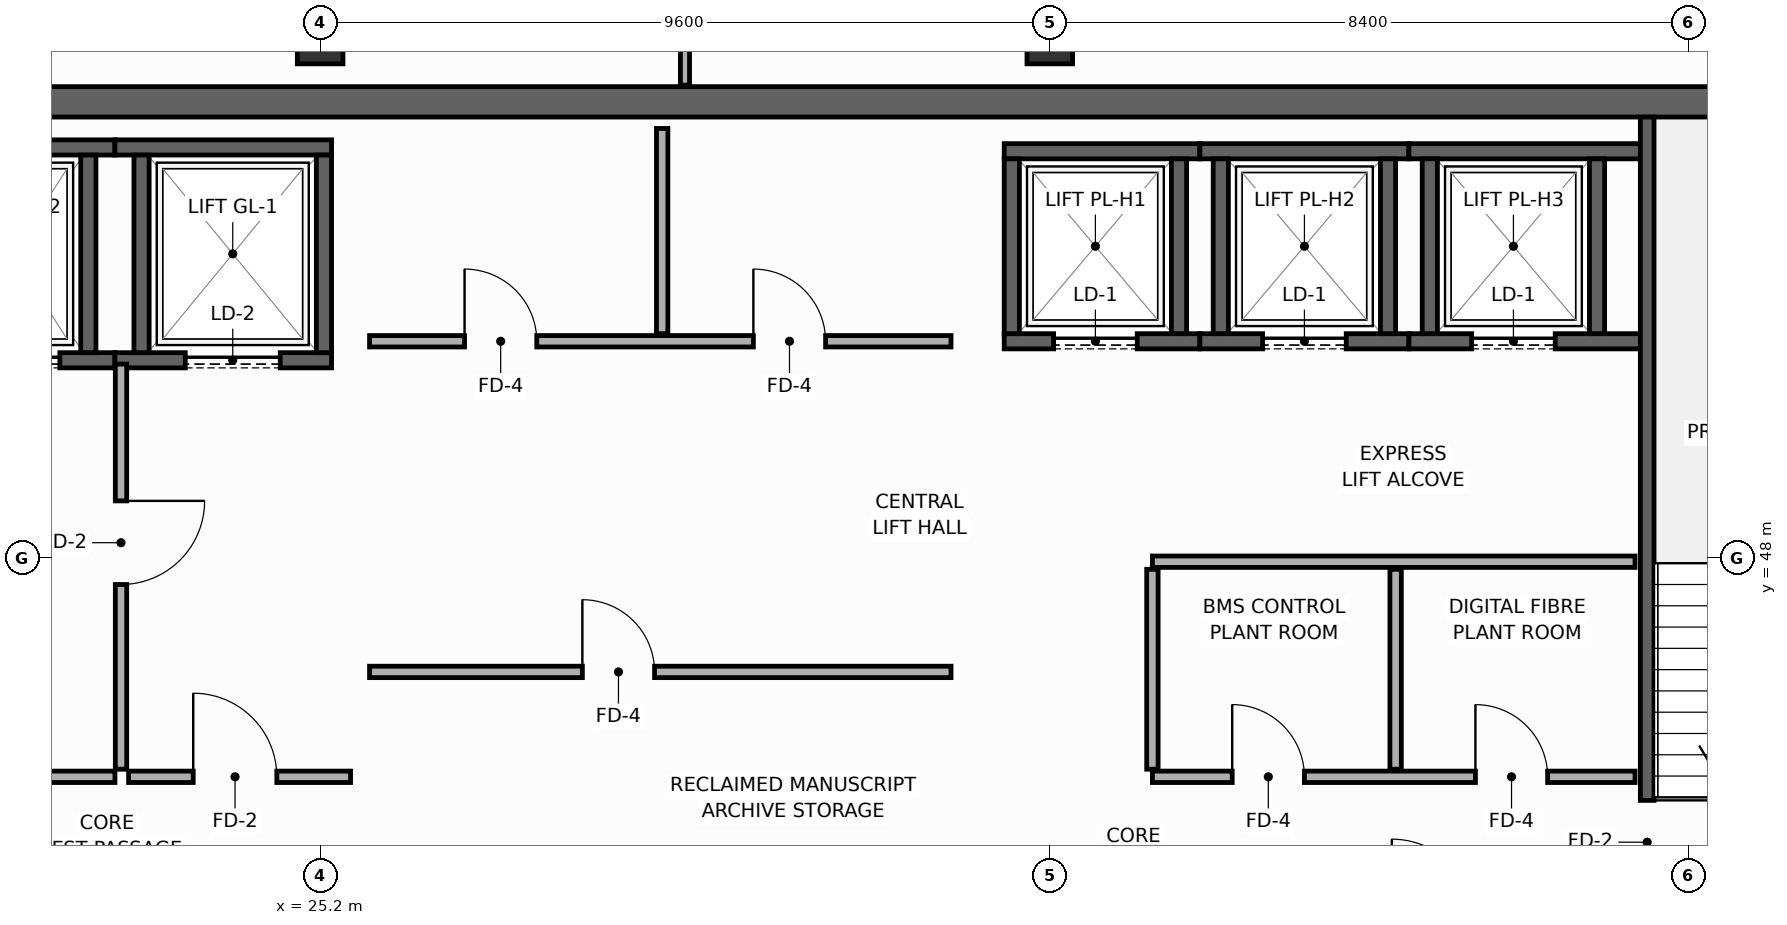
"""IFC4 building model, lengths in metres.
Left out: names, types, materials, properties, quantities, classifications, styles, units other than length and angle.
Written with IfcOpenShell. Run it as: python <this file> out.ifc"""

import sys

from ifc_helpers import new_model, si_unit, direction, frame, frame_2d, origin, origin_2d, place, context, subcontext, project, spatial, rectangle, hollow_rectangle, extrude, element, fill, save


model = new_model("IFC4")
c1 = context("Model", 3, precision=1e-05, world=origin(), true_north=direction((0.0, 1.0)))
c2 = subcontext(c1, "Body", "Model", "MODEL_VIEW")
j1 = project(units=[si_unit("LENGTHUNIT", "METRE"), si_unit("PLANEANGLEUNIT", "RADIAN")], contexts=[c1])
p1 = place(None, origin())
s1 = spatial("IfcSite", under=j1, at=p1, CompositionType="ELEMENT")
p2 = place(p1, origin())
s2 = spatial("IfcBuilding", under=s1, at=p2, CompositionType="ELEMENT")
p3 = place(p2, frame((0.0, 0.0, 319.2)))
s3 = spatial("IfcBuildingStorey", under=s2, at=p3, CompositionType="ELEMENT", Elevation=319.2)
p4 = place(p3, frame((13.7, 54.0, 0.0), z_axis=(0.0, 0.0, 1.0), x_axis=(1.0, 0.0, 0.0)))
e1 = element("IfcWall", 1, at=p4, inside=s3, PredefinedType="SHEAR", context=c2, shape_type="SweptSolid", body=[
    extrude(rectangle(XDim=32.5, YDim=0.4, at=frame_2d((16.25, 0.0))), origin(), (0.0, 0.0, 1.0), 3.95),
])
for number, where, z_axis, x_axis in (
    (2, (25.2, 54.8, 0.0), (0.0, 0.0, 1.0), (1.0, 0.0, 0.0)),
    (3, (34.8, 54.8, 0.0), (0.0, 0.0, 1.0), (1.0, 0.0, 0.0)),
):
    element("IfcColumn", number, at=place(p3, frame(where, z_axis=z_axis, x_axis=x_axis)), inside=s3, PredefinedType="COLUMN", context=c2, shape_type="SweptSolid", body=[
        extrude(hollow_rectangle(XDim=0.6, YDim=0.6, WallThickness=0.028, at=origin_2d()), origin(), (0.0, 0.0, 1.0), 4.2),
    ])
p5 = place(p3, frame((19.85, 50.6, 0.0), z_axis=(0.0, 0.0, 1.0), x_axis=(1.0, 0.0, 0.0)))
e4 = element("IfcWall", 4, at=p5, inside=s3, PredefinedType="SHEAR", context=c2, shape_type="SweptSolid", body=[
    extrude(rectangle(XDim=2.65, YDim=0.2, at=frame_2d((1.325, 0.0))), origin(), (0.0, 0.0, 1.0), 3.95),
])
p6 = place(p5, frame((0.675, 0.0, 0.0)))
e5 = element("IfcOpeningElement", 5, at=p6, cuts=e4, PredefinedType="OPENING", context=c2, shape_type="SweptSolid", body=[
    extrude(rectangle(XDim=1.25, YDim=2.3, at=frame_2d((0.625, 1.15))), frame((0.0, 0.11, 0.0), z_axis=(0.0, -1.0, 0.0), x_axis=(1.0, 0.0, 0.0)), (0.0, 0.0, 1.0), 0.22),
])
p7 = place(p3, frame((19.85, 53.4, 0.0), z_axis=(0.0, 0.0, 1.0), x_axis=(1.0, 0.0, 0.0)))
e6 = element("IfcWall", 6, at=p7, inside=s3, PredefinedType="SHEAR", context=c2, shape_type="SweptSolid", body=[
    extrude(rectangle(XDim=2.65, YDim=0.2, at=frame_2d((1.325, 0.0))), origin(), (0.0, 0.0, 1.0), 3.95),
])
p8 = place(p3, frame((22.15, 50.7, 0.0), z_axis=(0.0, 0.0, 1.0), x_axis=(0.0, 1.0, 0.0)))
e7 = element("IfcWall", 7, at=p8, inside=s3, PredefinedType="SHEAR", context=c2, shape_type="SweptSolid", body=[
    extrude(rectangle(XDim=2.6, YDim=0.2, at=frame_2d((1.3, 0.0))), origin(), (0.0, 0.0, 1.0), 3.95),
])
p9 = place(p3, frame((22.5, 50.6, 0.0), z_axis=(0.0, 0.0, 1.0), x_axis=(1.0, 0.0, 0.0)))
e8 = element("IfcWall", 8, at=p9, inside=s3, PredefinedType="SHEAR", context=c2, shape_type="SweptSolid", body=[
    extrude(rectangle(XDim=2.85, YDim=0.2, at=frame_2d((1.425, 0.0))), origin(), (0.0, 0.0, 1.0), 3.95),
])
p10 = place(p9, frame((0.925, 0.0, 0.0)))
e9 = element("IfcOpeningElement", 9, at=p10, cuts=e8, PredefinedType="OPENING", context=c2, shape_type="SweptSolid", body=[
    extrude(rectangle(XDim=1.25, YDim=2.3, at=frame_2d((0.625, 1.15))), frame((0.0, 0.11, 0.0), z_axis=(0.0, -1.0, 0.0), x_axis=(1.0, 0.0, 0.0)), (0.0, 0.0, 1.0), 0.22),
])
p11 = place(p3, frame((22.5, 53.4, 0.0), z_axis=(0.0, 0.0, 1.0), x_axis=(1.0, 0.0, 0.0)))
e10 = element("IfcWall", 10, at=p11, inside=s3, PredefinedType="SHEAR", context=c2, shape_type="SweptSolid", body=[
    extrude(rectangle(XDim=2.85, YDim=0.2, at=frame_2d((1.425, 0.0))), origin(), (0.0, 0.0, 1.0), 3.95),
])
for number, where, z_axis, x_axis in (
    (11, (22.85, 50.7, 0.0), (0.0, 0.0, 1.0), (0.0, 1.0, 0.0)),
    (12, (25.25, 50.7, 0.0), (0.0, 0.0, 1.0), (0.0, 1.0, 0.0)),
):
    element("IfcWall", number, at=place(p3, frame(where, z_axis=z_axis, x_axis=x_axis)), inside=s3, PredefinedType="SHEAR", context=c2, shape_type="SweptSolid", body=[
        extrude(rectangle(XDim=2.6, YDim=0.2, at=frame_2d((1.3, 0.0))), origin(), (0.0, 0.0, 1.0), 3.95),
    ])
p12 = place(p3, frame((34.2, 50.85, 0.0), z_axis=(0.0, 0.0, 1.0), x_axis=(1.0, 0.0, 0.0)))
e13 = element("IfcWall", 13, at=p12, inside=s3, PredefinedType="SHEAR", context=c2, shape_type="SweptSolid", body=[
    extrude(rectangle(XDim=2.575, YDim=0.2, at=frame_2d((1.288, 0.0))), origin(), (0.0, 0.0, 1.0), 3.95),
])
p13 = place(p12, frame((0.65, 0.0, 0.0)))
e14 = element("IfcOpeningElement", 14, at=p13, cuts=e13, PredefinedType="OPENING", context=c2, shape_type="SweptSolid", body=[
    extrude(rectangle(XDim=1.1, YDim=2.2, at=frame_2d((0.55, 1.1))), frame((0.0, 0.11, 0.0), z_axis=(0.0, -1.0, 0.0), x_axis=(1.0, 0.0, 0.0)), (0.0, 0.0, 1.0), 0.22),
])
p14 = place(p3, frame((34.2, 53.35, 0.0), z_axis=(0.0, 0.0, 1.0), x_axis=(1.0, 0.0, 0.0)))
e15 = element("IfcWall", 15, at=p14, inside=s3, PredefinedType="SHEAR", context=c2, shape_type="SweptSolid", body=[
    extrude(rectangle(XDim=2.575, YDim=0.2, at=frame_2d((1.288, 0.0))), origin(), (0.0, 0.0, 1.0), 3.95),
])
for number, where, z_axis, x_axis in (
    (16, (34.3, 50.95, 0.0), (0.0, 0.0, 1.0), (0.0, 1.0, 0.0)),
    (17, (36.5, 50.95, 0.0), (0.0, 0.0, 1.0), (0.0, 1.0, 0.0)),
):
    element("IfcWall", number, at=place(p3, frame(where, z_axis=z_axis, x_axis=x_axis)), inside=s3, PredefinedType="SHEAR", context=c2, shape_type="SweptSolid", body=[
        extrude(rectangle(XDim=2.3, YDim=0.2, at=frame_2d((1.15, 0.0))), origin(), (0.0, 0.0, 1.0), 3.95),
    ])
p15 = place(p3, frame((36.775, 50.85, 0.0), z_axis=(0.0, 0.0, 1.0), x_axis=(1.0, 0.0, 0.0)))
e18 = element("IfcWall", 18, at=p15, inside=s3, PredefinedType="SHEAR", context=c2, shape_type="SweptSolid", body=[
    extrude(rectangle(XDim=2.75, YDim=0.2, at=frame_2d((1.375, 0.0))), origin(), (0.0, 0.0, 1.0), 3.95),
])
p16 = place(p15, frame((0.825, 0.0, 0.0)))
e19 = element("IfcOpeningElement", 19, at=p16, cuts=e18, PredefinedType="OPENING", context=c2, shape_type="SweptSolid", body=[
    extrude(rectangle(XDim=1.1, YDim=2.2, at=frame_2d((0.55, 1.1))), frame((0.0, 0.11, 0.0), z_axis=(0.0, -1.0, 0.0), x_axis=(1.0, 0.0, 0.0)), (0.0, 0.0, 1.0), 0.22),
])
p17 = place(p3, frame((36.775, 53.35, 0.0), z_axis=(0.0, 0.0, 1.0), x_axis=(1.0, 0.0, 0.0)))
e20 = element("IfcWall", 20, at=p17, inside=s3, PredefinedType="SHEAR", context=c2, shape_type="SweptSolid", body=[
    extrude(rectangle(XDim=2.75, YDim=0.2, at=frame_2d((1.375, 0.0))), origin(), (0.0, 0.0, 1.0), 3.95),
])
for number, where, z_axis, x_axis in (
    (21, (37.05, 50.95, 0.0), (0.0, 0.0, 1.0), (0.0, 1.0, 0.0)),
    (22, (39.25, 50.95, 0.0), (0.0, 0.0, 1.0), (0.0, 1.0, 0.0)),
):
    element("IfcWall", number, at=place(p3, frame(where, z_axis=z_axis, x_axis=x_axis)), inside=s3, PredefinedType="SHEAR", context=c2, shape_type="SweptSolid", body=[
        extrude(rectangle(XDim=2.3, YDim=0.2, at=frame_2d((1.15, 0.0))), origin(), (0.0, 0.0, 1.0), 3.95),
    ])
p18 = place(p3, frame((39.525, 50.85, 0.0), z_axis=(0.0, 0.0, 1.0), x_axis=(1.0, 0.0, 0.0)))
e23 = element("IfcWall", 23, at=p18, inside=s3, PredefinedType="SHEAR", context=c2, shape_type="SweptSolid", body=[
    extrude(rectangle(XDim=3.045, YDim=0.2, at=frame_2d((1.522, 0.0))), origin(), (0.0, 0.0, 1.0), 3.95),
])
p19 = place(p18, frame((0.825, 0.0, 0.0)))
e24 = element("IfcOpeningElement", 24, at=p19, cuts=e23, PredefinedType="OPENING", context=c2, shape_type="SweptSolid", body=[
    extrude(rectangle(XDim=1.1, YDim=2.2, at=frame_2d((0.55, 1.1))), frame((0.0, 0.11, 0.0), z_axis=(0.0, -1.0, 0.0), x_axis=(1.0, 0.0, 0.0)), (0.0, 0.0, 1.0), 0.22),
])
p20 = place(p3, frame((39.525, 53.35, 0.0), z_axis=(0.0, 0.0, 1.0), x_axis=(1.0, 0.0, 0.0)))
e25 = element("IfcWall", 25, at=p20, inside=s3, PredefinedType="SHEAR", context=c2, shape_type="SweptSolid", body=[
    extrude(rectangle(XDim=3.045, YDim=0.2, at=frame_2d((1.522, 0.0))), origin(), (0.0, 0.0, 1.0), 3.95),
])
for number, where, z_axis, x_axis in (
    (26, (39.8, 50.95, 0.0), (0.0, 0.0, 1.0), (0.0, 1.0, 0.0)),
    (27, (42.0, 50.95, 0.0), (0.0, 0.0, 1.0), (0.0, 1.0, 0.0)),
):
    element("IfcWall", number, at=place(p3, frame(where, z_axis=z_axis, x_axis=x_axis)), inside=s3, PredefinedType="SHEAR", context=c2, shape_type="SweptSolid", body=[
        extrude(rectangle(XDim=2.3, YDim=0.2, at=frame_2d((1.15, 0.0))), origin(), (0.0, 0.0, 1.0), 3.95),
    ])
p21 = place(p3, frame((42.66, 53.8, 0.0), z_axis=(0.0, 0.0, 1.0), x_axis=(0.0, -1.0, 0.0)))
e28 = element("IfcWall", 28, at=p21, inside=s3, PredefinedType="SHEAR", context=c2, shape_type="SweptSolid", body=[
    extrude(rectangle(XDim=10.4, YDim=0.18, at=frame_2d((5.2, 0.0))), origin(), (0.0, 0.0, 1.0), 3.95),
])
p22 = place(p21, frame((8.99, 0.0, 0.0)))
e29 = element("IfcOpeningElement", 29, at=p22, cuts=e28, PredefinedType="OPENING", context=c2, shape_type="SweptSolid", body=[
    extrude(rectangle(XDim=1.1, YDim=2.15, at=frame_2d((0.55, 1.075))), frame((0.0, 0.1, 0.0), z_axis=(0.0, -1.0, 0.0), x_axis=(1.0, 0.0, 0.0)), (0.0, 0.0, 1.0), 0.2),
])
p23 = place(p3, frame((17.36, 45.12, 0.0), z_axis=(0.0, 0.0, 1.0), x_axis=(1.0, 0.0, 0.0)))
e30 = element("IfcWall", 30, at=p23, inside=s3, PredefinedType="PARTITIONING", context=c2, shape_type="SweptSolid", body=[
    extrude(rectangle(XDim=5.14, YDim=0.15, at=frame_2d((2.57, 0.0))), origin(), (0.0, 0.0, 1.0), 3.95),
])
p24 = place(p23, frame((1.8, 0.0, 0.0)))
e31 = element("IfcOpeningElement", 31, at=p24, cuts=e30, PredefinedType="OPENING", context=c2, shape_type="SweptSolid", body=[
    extrude(rectangle(XDim=1.1, YDim=2.15, at=frame_2d((0.55, 1.075))), frame((0.0, 0.085, 0.0), z_axis=(0.0, -1.0, 0.0), x_axis=(1.0, 0.0, 0.0)), (0.0, 0.0, 1.0), 0.17),
])
p25 = place(p3, frame((22.58, 50.55, 0.0), z_axis=(0.0, 0.0, 1.0), x_axis=(0.0, -1.0, 0.0)))
e32 = element("IfcWall", 32, at=p25, inside=s3, PredefinedType="PARTITIONING", context=c2, shape_type="SweptSolid", body=[
    extrude(rectangle(XDim=5.33, YDim=0.15, at=frame_2d((2.665, 0.0))), origin(), (0.0, 0.0, 1.0), 3.95),
])
p26 = place(p25, frame((1.8, 0.0, 0.0)))
e33 = element("IfcOpeningElement", 33, at=p26, cuts=e32, PredefinedType="OPENING", context=c2, shape_type="SweptSolid", body=[
    extrude(rectangle(XDim=1.1, YDim=2.15, at=frame_2d((0.55, 1.075))), frame((0.0, 0.085, 0.0), z_axis=(0.0, -1.0, 0.0), x_axis=(1.0, 0.0, 0.0)), (0.0, 0.0, 1.0), 0.17),
])
p27 = place(p3, frame((22.68, 45.12, 0.0), z_axis=(0.0, 0.0, 1.0), x_axis=(1.0, 0.0, 0.0)))
e34 = element("IfcWall", 34, at=p27, inside=s3, PredefinedType="PARTITIONING", context=c2, shape_type="SweptSolid", body=[
    extrude(rectangle(XDim=2.92, YDim=0.15, at=frame_2d((1.46, 0.0))), origin(), (0.0, 0.0, 1.0), 3.95),
])
p28 = place(p27, frame((0.85, 0.0, 0.0)))
e35 = element("IfcOpeningElement", 35, at=p28, cuts=e34, PredefinedType="OPENING", context=c2, shape_type="SweptSolid", body=[
    extrude(rectangle(XDim=1.1, YDim=2.15, at=frame_2d((0.55, 1.075))), frame((0.0, 0.085, 0.0), z_axis=(0.0, -1.0, 0.0), x_axis=(1.0, 0.0, 0.0)), (0.0, 0.0, 1.0), 0.17),
])
p29 = place(p3, frame((36.15, 45.12, 0.0), z_axis=(0.0, 0.0, 1.0), x_axis=(1.0, 0.0, 0.0)))
e36 = element("IfcWall", 36, at=p29, inside=s3, PredefinedType="PARTITIONING", context=c2, shape_type="SweptSolid", body=[
    extrude(rectangle(XDim=6.35, YDim=0.15, at=frame_2d((3.175, 0.0))), origin(), (0.0, 0.0, 1.0), 3.95),
])
p30 = place(p29, frame((1.05, 0.0, 0.0)))
e37 = element("IfcOpeningElement", 37, at=p30, cuts=e36, PredefinedType="OPENING", context=c2, shape_type="SweptSolid", body=[
    extrude(rectangle(XDim=0.95, YDim=2.15, at=frame_2d((0.475, 1.075))), frame((0.0, 0.085, 0.0), z_axis=(0.0, -1.0, 0.0), x_axis=(1.0, 0.0, 0.0)), (0.0, 0.0, 1.0), 0.17),
])
p31 = place(p29, frame((4.25, 0.0, 0.0)))
e38 = element("IfcOpeningElement", 38, at=p31, cuts=e36, PredefinedType="OPENING", context=c2, shape_type="SweptSolid", body=[
    extrude(rectangle(XDim=0.95, YDim=2.15, at=frame_2d((0.475, 1.075))), frame((0.0, 0.085, 0.0), z_axis=(0.0, -1.0, 0.0), x_axis=(1.0, 0.0, 0.0)), (0.0, 0.0, 1.0), 0.17),
])
p32 = place(p3, frame((36.15, 47.95, 0.0), z_axis=(0.0, 0.0, 1.0), x_axis=(1.0, 0.0, 0.0)))
e39 = element("IfcWall", 39, at=p32, inside=s3, PredefinedType="PARTITIONING", context=c2, shape_type="SweptSolid", body=[
    extrude(rectangle(XDim=6.35, YDim=0.15, at=frame_2d((3.175, 0.0))), origin(), (0.0, 0.0, 1.0), 3.95),
])
for number, where, z_axis, x_axis in (
    (40, (36.15, 45.22, 0.0), (0.0, 0.0, 1.0), (0.0, 1.0, 0.0)),
    (41, (39.35, 45.22, 0.0), (0.0, 0.0, 1.0), (0.0, 1.0, 0.0)),
):
    element("IfcWall", number, at=place(p3, frame(where, z_axis=z_axis, x_axis=x_axis)), inside=s3, PredefinedType="PARTITIONING", context=c2, shape_type="SweptSolid", body=[
        extrude(rectangle(XDim=2.63, YDim=0.15, at=frame_2d((1.315, 0.0))), origin(), (0.0, 0.0, 1.0), 3.95),
    ])
p33 = place(p3, frame((25.85, 50.85, 0.0), z_axis=(0.0, 0.0, 1.0), x_axis=(1.0, 0.0, 0.0)))
e42 = element("IfcWall", 42, at=p33, inside=s3, PredefinedType="PARTITIONING", context=c2, shape_type="SweptSolid", body=[
    extrude(rectangle(XDim=7.65, YDim=0.15, at=frame_2d((3.825, 0.0))), origin(), (0.0, 0.0, 1.0), 3.95),
])
p34 = place(p33, frame((1.25, 0.0, 0.0)))
e43 = element("IfcOpeningElement", 43, at=p34, cuts=e42, PredefinedType="OPENING", context=c2, shape_type="SweptSolid", body=[
    extrude(rectangle(XDim=0.95, YDim=2.15, at=frame_2d((0.475, 1.075))), frame((0.0, 0.085, 0.0), z_axis=(0.0, -1.0, 0.0), x_axis=(1.0, 0.0, 0.0)), (0.0, 0.0, 1.0), 0.17),
])
p35 = place(p33, frame((5.05, 0.0, 0.0)))
e44 = element("IfcOpeningElement", 44, at=p35, cuts=e42, PredefinedType="OPENING", context=c2, shape_type="SweptSolid", body=[
    extrude(rectangle(XDim=0.95, YDim=2.15, at=frame_2d((0.475, 1.075))), frame((0.0, 0.085, 0.0), z_axis=(0.0, -1.0, 0.0), x_axis=(1.0, 0.0, 0.0)), (0.0, 0.0, 1.0), 0.17),
])
p36 = place(p3, frame((29.7, 50.95, 0.0), z_axis=(0.0, 0.0, 1.0), x_axis=(0.0, 1.0, 0.0)))
e45 = element("IfcWall", 45, at=p36, inside=s3, PredefinedType="PARTITIONING", context=c2, shape_type="SweptSolid", body=[
    extrude(rectangle(XDim=2.7, YDim=0.15, at=frame_2d((1.35, 0.0))), origin(), (0.0, 0.0, 1.0), 3.95),
])
p37 = place(p3, frame((25.85, 46.5, 0.0), z_axis=(0.0, 0.0, 1.0), x_axis=(1.0, 0.0, 0.0)))
e46 = element("IfcWall", 46, at=p37, inside=s3, PredefinedType="PARTITIONING", context=c2, shape_type="SweptSolid", body=[
    extrude(rectangle(XDim=7.65, YDim=0.15, at=frame_2d((3.825, 0.0))), origin(), (0.0, 0.0, 1.0), 3.95),
])
p38 = place(p37, frame((2.8, 0.0, 0.0)))
e47 = element("IfcOpeningElement", 47, at=p38, cuts=e46, PredefinedType="OPENING", context=c2, shape_type="SweptSolid", body=[
    extrude(rectangle(XDim=0.95, YDim=2.15, at=frame_2d((0.475, 1.075))), frame((0.0, 0.085, 0.0), z_axis=(0.0, -1.0, 0.0), x_axis=(1.0, 0.0, 0.0)), (0.0, 0.0, 1.0), 0.17),
])
p39 = place(p3, frame((30.0, 54.22, 0.0), z_axis=(0.0, 0.0, 1.0), x_axis=(0.0, 1.0, 0.0)))
e48 = element("IfcWall", 48, at=p39, inside=s3, PredefinedType="PARTITIONING", context=c2, shape_type="SweptSolid", body=[
    extrude(rectangle(XDim=1.775, YDim=0.12, at=frame_2d((0.888, 0.0))), origin(), (0.0, 0.0, 1.0), 3.335),
])
p40 = place(p6, origin())
e49 = element("IfcDoor", 49, at=p40, inside=s3, OperationType="SLIDING_TO_LEFT", PredefinedType="DOOR", context=c2, shape_type="SweptSolid", body=[
    extrude(rectangle(XDim=1.25, YDim=2.3, at=frame_2d((0.625, 1.15))), frame((0.0, 0.025, 0.0), z_axis=(0.0, -1.0, 0.0), x_axis=(1.0, 0.0, 0.0)), (0.0, 0.0, 1.0), 0.05),
])
fill(e5, e49)
p41 = place(p10, origin())
e50 = element("IfcDoor", 50, at=p41, inside=s3, OperationType="SLIDING_TO_LEFT", PredefinedType="DOOR", context=c2, shape_type="SweptSolid", body=[
    extrude(rectangle(XDim=1.25, YDim=2.3, at=frame_2d((0.625, 1.15))), frame((0.0, 0.025, 0.0), z_axis=(0.0, -1.0, 0.0), x_axis=(1.0, 0.0, 0.0)), (0.0, 0.0, 1.0), 0.05),
])
fill(e9, e50)
p42 = place(p13, origin())
e51 = element("IfcDoor", 51, at=p42, inside=s3, OperationType="SLIDING_TO_LEFT", PredefinedType="DOOR", context=c2, shape_type="SweptSolid", body=[
    extrude(rectangle(XDim=1.1, YDim=2.2, at=frame_2d((0.55, 1.1))), frame((0.0, 0.025, 0.0), z_axis=(0.0, -1.0, 0.0), x_axis=(1.0, 0.0, 0.0)), (0.0, 0.0, 1.0), 0.05),
])
fill(e14, e51)
p43 = place(p16, origin())
e52 = element("IfcDoor", 52, at=p43, inside=s3, OperationType="SLIDING_TO_LEFT", PredefinedType="DOOR", context=c2, shape_type="SweptSolid", body=[
    extrude(rectangle(XDim=1.1, YDim=2.2, at=frame_2d((0.55, 1.1))), frame((0.0, 0.025, 0.0), z_axis=(0.0, -1.0, 0.0), x_axis=(1.0, 0.0, 0.0)), (0.0, 0.0, 1.0), 0.05),
])
fill(e19, e52)
p44 = place(p19, origin())
e53 = element("IfcDoor", 53, at=p44, inside=s3, OperationType="SLIDING_TO_LEFT", PredefinedType="DOOR", context=c2, shape_type="SweptSolid", body=[
    extrude(rectangle(XDim=1.1, YDim=2.2, at=frame_2d((0.55, 1.1))), frame((0.0, 0.025, 0.0), z_axis=(0.0, -1.0, 0.0), x_axis=(1.0, 0.0, 0.0)), (0.0, 0.0, 1.0), 0.05),
])
fill(e24, e53)
p45 = place(p22, origin())
e54 = element("IfcDoor", 54, at=p45, inside=s3, OperationType="SINGLE_SWING_LEFT", PredefinedType="DOOR", context=c2, shape_type="SweptSolid", body=[
    extrude(rectangle(XDim=1.1, YDim=2.15, at=frame_2d((0.55, 1.075))), frame((0.0, 0.025, 0.0), z_axis=(0.0, -1.0, 0.0), x_axis=(1.0, 0.0, 0.0)), (0.0, 0.0, 1.0), 0.05),
])
fill(e29, e54)
p46 = place(p26, origin())
e55 = element("IfcDoor", 55, at=p46, inside=s3, OperationType="SINGLE_SWING_LEFT", PredefinedType="DOOR", context=c2, shape_type="SweptSolid", body=[
    extrude(rectangle(XDim=1.1, YDim=2.15, at=frame_2d((0.55, 1.075))), frame((0.0, 0.025, 0.0), z_axis=(0.0, -1.0, 0.0), x_axis=(1.0, 0.0, 0.0)), (0.0, 0.0, 1.0), 0.05),
])
fill(e33, e55)
p47 = place(p28, origin())
e56 = element("IfcDoor", 56, at=p47, inside=s3, OperationType="SINGLE_SWING_LEFT", PredefinedType="DOOR", context=c2, shape_type="SweptSolid", body=[
    extrude(rectangle(XDim=1.1, YDim=2.15, at=frame_2d((0.55, 1.075))), frame((0.0, 0.025, 0.0), z_axis=(0.0, -1.0, 0.0), x_axis=(1.0, 0.0, 0.0)), (0.0, 0.0, 1.0), 0.05),
])
fill(e35, e56)
p48 = place(p30, origin())
e57 = element("IfcDoor", 57, at=p48, inside=s3, OperationType="SINGLE_SWING_LEFT", PredefinedType="DOOR", context=c2, shape_type="SweptSolid", body=[
    extrude(rectangle(XDim=0.95, YDim=2.15, at=frame_2d((0.475, 1.075))), frame((0.0, 0.025, 0.0), z_axis=(0.0, -1.0, 0.0), x_axis=(1.0, 0.0, 0.0)), (0.0, 0.0, 1.0), 0.05),
])
fill(e37, e57)
p49 = place(p31, origin())
e58 = element("IfcDoor", 58, at=p49, inside=s3, OperationType="SINGLE_SWING_LEFT", PredefinedType="DOOR", context=c2, shape_type="SweptSolid", body=[
    extrude(rectangle(XDim=0.95, YDim=2.15, at=frame_2d((0.475, 1.075))), frame((0.0, 0.025, 0.0), z_axis=(0.0, -1.0, 0.0), x_axis=(1.0, 0.0, 0.0)), (0.0, 0.0, 1.0), 0.05),
])
fill(e38, e58)
p50 = place(p34, origin())
e59 = element("IfcDoor", 59, at=p50, inside=s3, OperationType="SINGLE_SWING_LEFT", PredefinedType="DOOR", context=c2, shape_type="SweptSolid", body=[
    extrude(rectangle(XDim=0.95, YDim=2.15, at=frame_2d((0.475, 1.075))), frame((0.0, 0.025, 0.0), z_axis=(0.0, -1.0, 0.0), x_axis=(1.0, 0.0, 0.0)), (0.0, 0.0, 1.0), 0.05),
])
fill(e43, e59)
p51 = place(p35, origin())
e60 = element("IfcDoor", 60, at=p51, inside=s3, OperationType="SINGLE_SWING_LEFT", PredefinedType="DOOR", context=c2, shape_type="SweptSolid", body=[
    extrude(rectangle(XDim=0.95, YDim=2.15, at=frame_2d((0.475, 1.075))), frame((0.0, 0.025, 0.0), z_axis=(0.0, -1.0, 0.0), x_axis=(1.0, 0.0, 0.0)), (0.0, 0.0, 1.0), 0.05),
])
fill(e44, e60)
p52 = place(p38, origin())
e61 = element("IfcDoor", 61, at=p52, inside=s3, OperationType="SINGLE_SWING_LEFT", PredefinedType="DOOR", context=c2, shape_type="SweptSolid", body=[
    extrude(rectangle(XDim=0.95, YDim=2.15, at=frame_2d((0.475, 1.075))), frame((0.0, 0.025, 0.0), z_axis=(0.0, -1.0, 0.0), x_axis=(1.0, 0.0, 0.0)), (0.0, 0.0, 1.0), 0.05),
])
fill(e47, e61)
save(model, sys.argv[1])
